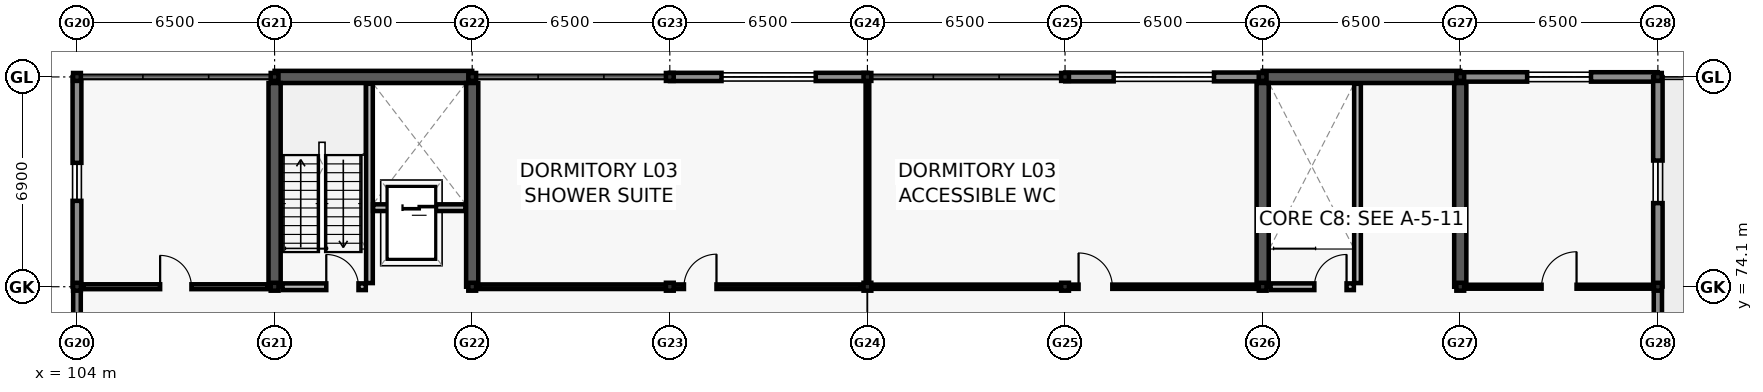
"""IFC4 building model, lengths in metres.
Left out: names, types, materials, properties, quantities, classifications, styles, units other than length and angle.
Written with IfcOpenShell. Run it as: python <this file> out.ifc"""

import sys

from ifc_helpers import new_model, si_unit, direction, frame, frame_2d, origin, origin_2d, place, context, subcontext, project, spatial, rectangle, i_section, extrude, element, fill, save


model = new_model("IFC4")
c1 = context("Model", 3, precision=1e-05, world=origin(), true_north=direction((0.0, 1.0)))
c2 = subcontext(c1, "Body", "Model", "MODEL_VIEW")
j1 = project(units=[si_unit("LENGTHUNIT", "METRE"), si_unit("PLANEANGLEUNIT", "RADIAN")], contexts=[c1])
p1 = place(None, origin())
s1 = spatial("IfcSite", under=j1, at=p1, CompositionType="ELEMENT")
p2 = place(p1, origin())
s2 = spatial("IfcBuilding", under=s1, at=p2, CompositionType="ELEMENT")
p3 = place(p2, frame((0.0, 0.0, 13.5)))
s3 = spatial("IfcBuildingStorey", under=s2, at=p3, CompositionType="ELEMENT", Elevation=13.5)
for number, where, z_axis, x_axis in (
    (1, (104.0, 74.1, 0.0), (0.0, 0.0, 1.0), (1.0, 0.0, 0.0)),
    (2, (104.0, 81.0, 0.0), (0.0, 0.0, 1.0), (1.0, 0.0, 0.0)),
    (3, (110.5, 74.1, 0.0), (0.0, 0.0, 1.0), (1.0, 0.0, 0.0)),
    (4, (110.5, 81.0, 0.0), (0.0, 0.0, 1.0), (1.0, 0.0, 0.0)),
    (5, (117.0, 74.1, 0.0), (0.0, 0.0, 1.0), (1.0, 0.0, 0.0)),
    (6, (117.0, 81.0, 0.0), (0.0, 0.0, 1.0), (1.0, 0.0, 0.0)),
    (7, (123.5, 74.1, 0.0), (0.0, 0.0, 1.0), (1.0, 0.0, 0.0)),
    (8, (123.5, 81.0, 0.0), (0.0, 0.0, 1.0), (1.0, 0.0, 0.0)),
    (9, (130.0, 74.1, 0.0), (0.0, 0.0, 1.0), (1.0, 0.0, 0.0)),
    (10, (130.0, 81.0, 0.0), (0.0, 0.0, 1.0), (1.0, 0.0, 0.0)),
    (11, (136.5, 74.1, 0.0), (0.0, 0.0, 1.0), (1.0, 0.0, 0.0)),
    (12, (136.5, 81.0, 0.0), (0.0, 0.0, 1.0), (1.0, 0.0, 0.0)),
    (13, (143.0, 74.1, 0.0), (0.0, 0.0, 1.0), (1.0, 0.0, 0.0)),
    (14, (143.0, 81.0, 0.0), (0.0, 0.0, 1.0), (1.0, 0.0, 0.0)),
    (15, (149.5, 74.1, 0.0), (0.0, 0.0, 1.0), (1.0, 0.0, 0.0)),
    (16, (149.5, 81.0, 0.0), (0.0, 0.0, 1.0), (1.0, 0.0, 0.0)),
    (17, (156.0, 74.1, 0.0), (0.0, 0.0, 1.0), (1.0, 0.0, 0.0)),
    (18, (156.0, 81.0, 0.0), (0.0, 0.0, 1.0), (1.0, 0.0, 0.0)),
):
    element("IfcColumn", number, at=place(p3, frame(where, z_axis=z_axis, x_axis=x_axis)), inside=s3, PredefinedType="COLUMN", context=c2, shape_type="SweptSolid", body=[
        extrude(i_section(OverallWidth=0.256, OverallDepth=0.26, WebThickness=0.01, FlangeThickness=0.017, FilletRadius=0.013, at=origin_2d()), origin(), (0.0, 0.0, 1.0), 3.9),
    ])
p4 = place(p3, frame((110.5, 81.0, 0.0), z_axis=(0.0, 0.0, 1.0), x_axis=(1.0, 0.0, 0.0)))
e19 = element("IfcWall", 19, at=p4, inside=s3, PredefinedType="SHEAR", context=c2, shape_type="SweptSolid", body=[
    extrude(rectangle(XDim=6.5, YDim=0.4, at=frame_2d((3.25, 0.0))), origin(), (0.0, 0.0, 1.0), 3.66),
])
for number, where, z_axis, x_axis in (
    (20, (110.5, 74.1, 0.0), (0.0, 0.0, 1.0), (0.0, 1.0, 0.0)),
    (21, (117.0, 74.1, 0.0), (0.0, 0.0, 1.0), (0.0, 1.0, 0.0)),
):
    element("IfcWall", number, at=place(p3, frame(where, z_axis=z_axis, x_axis=x_axis)), inside=s3, PredefinedType="SHEAR", context=c2, shape_type="SweptSolid", body=[
        extrude(rectangle(XDim=6.7, YDim=0.4, at=frame_2d((3.35, 0.0))), origin(), (0.0, 0.0, 1.0), 3.66),
    ])
p5 = place(p3, frame((143.0, 81.0, 0.0), z_axis=(0.0, 0.0, 1.0), x_axis=(1.0, 0.0, 0.0)))
e22 = element("IfcWall", 22, at=p5, inside=s3, PredefinedType="SHEAR", context=c2, shape_type="SweptSolid", body=[
    extrude(rectangle(XDim=6.5, YDim=0.4, at=frame_2d((3.25, 0.0))), origin(), (0.0, 0.0, 1.0), 3.66),
])
for number, where, z_axis, x_axis in (
    (23, (143.0, 74.1, 0.0), (0.0, 0.0, 1.0), (0.0, 1.0, 0.0)),
    (24, (149.5, 74.1, 0.0), (0.0, 0.0, 1.0), (0.0, 1.0, 0.0)),
):
    element("IfcWall", number, at=place(p3, frame(where, z_axis=z_axis, x_axis=x_axis)), inside=s3, PredefinedType="SHEAR", context=c2, shape_type="SweptSolid", body=[
        extrude(rectangle(XDim=6.7, YDim=0.4, at=frame_2d((3.35, 0.0))), origin(), (0.0, 0.0, 1.0), 3.66),
    ])
p6 = place(p3, frame((123.505, 81.0, 0.0), z_axis=(0.0, 0.0, 1.0), x_axis=(1.0, 0.0, 0.0)))
e25 = element("IfcWall", 25, at=p6, inside=s3, PredefinedType="SOLIDWALL", context=c2, shape_type="SweptSolid", body=[
    extrude(rectangle(XDim=6.49, YDim=0.27, at=frame_2d((3.245, 0.0))), origin(), (0.0, 0.0, 1.0), 3.02),
])
p7 = place(p6, frame((1.695, 0.0, 0.8)))
e26 = element("IfcOpeningElement", 26, at=p7, cuts=e25, PredefinedType="OPENING", context=c2, shape_type="SweptSolid", body=[
    extrude(rectangle(XDim=3.1, YDim=1.15, at=frame_2d((1.55, 0.575))), frame((0.0, 0.145, 0.0), z_axis=(0.0, -1.0, 0.0), x_axis=(1.0, 0.0, 0.0)), (0.0, 0.0, 1.0), 0.29),
])
p8 = place(p3, frame((136.505, 81.0, 0.0), z_axis=(0.0, 0.0, 1.0), x_axis=(1.0, 0.0, 0.0)))
e27 = element("IfcWall", 27, at=p8, inside=s3, PredefinedType="SOLIDWALL", context=c2, shape_type="SweptSolid", body=[
    extrude(rectangle(XDim=6.49, YDim=0.29, at=frame_2d((3.245, 0.0))), origin(), (0.0, 0.0, 1.0), 3.02),
])
p9 = place(p8, frame((1.595, 0.0, 0.8)))
e28 = element("IfcOpeningElement", 28, at=p9, cuts=e27, PredefinedType="OPENING", context=c2, shape_type="SweptSolid", body=[
    extrude(rectangle(XDim=3.3, YDim=1.25, at=frame_2d((1.65, 0.625))), frame((0.0, 0.155, 0.0), z_axis=(0.0, -1.0, 0.0), x_axis=(1.0, 0.0, 0.0)), (0.0, 0.0, 1.0), 0.31),
])
p10 = place(p3, frame((149.505, 81.0, 0.0), z_axis=(0.0, 0.0, 1.0), x_axis=(1.0, 0.0, 0.0)))
e29 = element("IfcWall", 29, at=p10, inside=s3, PredefinedType="SOLIDWALL", context=c2, shape_type="SweptSolid", body=[
    extrude(rectangle(XDim=6.49, YDim=0.31, at=frame_2d((3.245, 0.0))), origin(), (0.0, 0.0, 1.0), 3.02),
])
p11 = place(p10, frame((2.195, 0.0, 0.8)))
e30 = element("IfcOpeningElement", 30, at=p11, cuts=e29, PredefinedType="OPENING", context=c2, shape_type="SweptSolid", body=[
    extrude(rectangle(XDim=2.1, YDim=1.25, at=frame_2d((1.05, 0.625))), frame((0.0, 0.165, 0.0), z_axis=(0.0, -1.0, 0.0), x_axis=(1.0, 0.0, 0.0)), (0.0, 0.0, 1.0), 0.33),
])
p12 = place(p3, frame((104.0, 67.205, 0.0), z_axis=(0.0, 0.0, 1.0), x_axis=(0.0, 1.0, 0.0)))
e31 = element("IfcWall", 31, at=p12, inside=s3, PredefinedType="SOLIDWALL", context=c2, shape_type="SweptSolid", body=[
    extrude(rectangle(XDim=6.89, YDim=0.25, at=frame_2d((3.445, 0.0))), origin(), (0.0, 0.0, 1.0), 3.02),
])
p13 = place(p12, frame((1.613, 0.0, 0.8)))
e32 = element("IfcOpeningElement", 32, at=p13, cuts=e31, PredefinedType="OPENING", context=c2, shape_type="SweptSolid", body=[
    extrude(rectangle(XDim=1.1, YDim=1.5, at=frame_2d((0.55, 0.75))), frame((0.0, 0.135, 0.0), z_axis=(0.0, -1.0, 0.0), x_axis=(1.0, 0.0, 0.0)), (0.0, 0.0, 1.0), 0.27),
])
p14 = place(p3, frame((156.0, 74.095, 0.0), z_axis=(0.0, 0.0, 1.0), x_axis=(0.0, -1.0, 0.0)))
e33 = element("IfcWall", 33, at=p14, inside=s3, PredefinedType="SOLIDWALL", context=c2, shape_type="SweptSolid", body=[
    extrude(rectangle(XDim=6.89, YDim=0.27, at=frame_2d((3.445, 0.0))), origin(), (0.0, 0.0, 1.0), 3.02),
])
p15 = place(p14, frame((2.935, 0.0, 0.0)))
e34 = element("IfcOpeningElement", 34, at=p15, cuts=e33, PredefinedType="OPENING", context=c2, shape_type="SweptSolid", body=[
    extrude(rectangle(XDim=1.02, YDim=2.14, at=frame_2d((0.51, 1.07))), frame((0.0, 0.145, 0.0), z_axis=(0.0, -1.0, 0.0), x_axis=(1.0, 0.0, 0.0)), (0.0, 0.0, 1.0), 0.29),
])
p16 = place(p3, frame((104.0, 74.105, 0.0), z_axis=(0.0, 0.0, 1.0), x_axis=(0.0, 1.0, 0.0)))
e35 = element("IfcWall", 35, at=p16, inside=s3, PredefinedType="SOLIDWALL", context=c2, shape_type="SweptSolid", body=[
    extrude(rectangle(XDim=6.89, YDim=0.29, at=frame_2d((3.445, 0.0))), origin(), (0.0, 0.0, 1.0), 3.02),
])
p17 = place(p16, frame((2.82, 0.0, 0.8)))
e36 = element("IfcOpeningElement", 36, at=p17, cuts=e35, PredefinedType="OPENING", context=c2, shape_type="SweptSolid", body=[
    extrude(rectangle(XDim=1.25, YDim=1.5, at=frame_2d((0.625, 0.75))), frame((0.0, 0.155, 0.0), z_axis=(0.0, -1.0, 0.0), x_axis=(1.0, 0.0, 0.0)), (0.0, 0.0, 1.0), 0.31),
])
p18 = place(p3, frame((156.0, 80.995, 0.0), z_axis=(0.0, 0.0, 1.0), x_axis=(0.0, -1.0, 0.0)))
e37 = element("IfcWall", 37, at=p18, inside=s3, PredefinedType="SOLIDWALL", context=c2, shape_type="SweptSolid", body=[
    extrude(rectangle(XDim=6.89, YDim=0.31, at=frame_2d((3.445, 0.0))), origin(), (0.0, 0.0, 1.0), 3.02),
])
p19 = place(p18, frame((2.745, 0.0, 0.8)))
e38 = element("IfcOpeningElement", 38, at=p19, cuts=e37, PredefinedType="OPENING", context=c2, shape_type="SweptSolid", body=[
    extrude(rectangle(XDim=1.4, YDim=1.5, at=frame_2d((0.7, 0.75))), frame((0.0, 0.165, 0.0), z_axis=(0.0, -1.0, 0.0), x_axis=(1.0, 0.0, 0.0)), (0.0, 0.0, 1.0), 0.33),
])
p20 = place(p3, frame((113.62, 74.22, 0.0), z_axis=(0.0, 0.0, 1.0), x_axis=(0.0, 1.0, 0.0)))
e39 = element("IfcWall", 39, at=p20, inside=s3, PredefinedType="SOLIDWALL", context=c2, shape_type="SweptSolid", body=[
    extrude(rectangle(XDim=6.555, YDim=0.22, at=frame_2d((3.277, 0.0))), origin(), (0.0, 0.0, 1.0), 3.66),
])
p21 = place(p3, frame((110.76, 74.1, 0.0), z_axis=(0.0, 0.0, 1.0), x_axis=(1.0, 0.0, 0.0)))
e40 = element("IfcWall", 40, at=p21, inside=s3, PredefinedType="SOLIDWALL", context=c2, shape_type="SweptSolid", body=[
    extrude(rectangle(XDim=2.74, YDim=0.22, at=frame_2d((1.37, 0.0))), origin(), (0.0, 0.0, 1.0), 3.02),
])
p22 = place(p21, frame((1.44, 0.0, 0.0)))
e41 = element("IfcOpeningElement", 41, at=p22, cuts=e40, PredefinedType="OPENING", context=c2, shape_type="SweptSolid", body=[
    extrude(rectangle(XDim=1.06, YDim=2.1, at=frame_2d((0.53, 1.05))), frame((0.0, 0.12, 0.0), z_axis=(0.0, -1.0, 0.0), x_axis=(1.0, 0.0, 0.0)), (0.0, 0.0, 1.0), 0.24),
])
p23 = place(p3, frame((113.74, 76.7, 0.0), z_axis=(0.0, 0.0, 1.0), x_axis=(1.0, 0.0, 0.0)))
e42 = element("IfcWall", 42, at=p23, inside=s3, PredefinedType="SOLIDWALL", context=c2, shape_type="SweptSolid", body=[
    extrude(rectangle(XDim=3.035, YDim=0.22, at=frame_2d((1.518, 0.0))), origin(), (0.0, 0.0, 1.0), 3.66),
])
p24 = place(p23, frame((0.968, 0.0, 0.0)))
e43 = element("IfcOpeningElement", 43, at=p24, cuts=e42, PredefinedType="OPENING", context=c2, shape_type="SweptSolid", body=[
    extrude(rectangle(XDim=1.1, YDim=2.1, at=frame_2d((0.55, 1.05))), frame((0.0, 0.12, 0.0), z_axis=(0.0, -1.0, 0.0), x_axis=(1.0, 0.0, 0.0)), (0.0, 0.0, 1.0), 0.24),
])
p25 = place(p3, frame((146.12, 74.22, 0.0), z_axis=(0.0, 0.0, 1.0), x_axis=(0.0, 1.0, 0.0)))
e44 = element("IfcWall", 44, at=p25, inside=s3, PredefinedType="SOLIDWALL", context=c2, shape_type="SweptSolid", body=[
    extrude(rectangle(XDim=6.555, YDim=0.22, at=frame_2d((3.277, 0.0))), origin(), (0.0, 0.0, 1.0), 3.66),
])
p26 = place(p3, frame((143.26, 74.1, 0.0), z_axis=(0.0, 0.0, 1.0), x_axis=(1.0, 0.0, 0.0)))
e45 = element("IfcWall", 45, at=p26, inside=s3, PredefinedType="SOLIDWALL", context=c2, shape_type="SweptSolid", body=[
    extrude(rectangle(XDim=2.74, YDim=0.22, at=frame_2d((1.37, 0.0))), origin(), (0.0, 0.0, 1.0), 3.02),
])
p27 = place(p26, frame((1.44, 0.0, 0.0)))
e46 = element("IfcOpeningElement", 46, at=p27, cuts=e45, PredefinedType="OPENING", context=c2, shape_type="SweptSolid", body=[
    extrude(rectangle(XDim=1.06, YDim=2.1, at=frame_2d((0.53, 1.05))), frame((0.0, 0.12, 0.0), z_axis=(0.0, -1.0, 0.0), x_axis=(1.0, 0.0, 0.0)), (0.0, 0.0, 1.0), 0.24),
])
p28 = place(p3, frame((104.22, 74.1, 0.0), z_axis=(0.0, 0.0, 1.0), x_axis=(1.0, 0.0, 0.0)))
e47 = element("IfcWall", 47, at=p28, inside=s3, PredefinedType="PARTITIONING", context=c2, shape_type="SweptSolid", body=[
    extrude(rectangle(XDim=6.06, YDim=0.16, at=frame_2d((3.03, 0.0))), origin(), (0.0, 0.0, 1.0), 3.0),
])
p29 = place(p28, frame((2.515, 0.0, 0.0)))
e48 = element("IfcOpeningElement", 48, at=p29, cuts=e47, PredefinedType="OPENING", context=c2, shape_type="SweptSolid", body=[
    extrude(rectangle(XDim=1.03, YDim=2.06, at=frame_2d((0.515, 1.03))), frame((0.0, 0.09, 0.0), z_axis=(0.0, -1.0, 0.0), x_axis=(1.0, 0.0, 0.0)), (0.0, 0.0, 1.0), 0.18),
])
p30 = place(p3, frame((117.22, 74.1, 0.0), z_axis=(0.0, 0.0, 1.0), x_axis=(1.0, 0.0, 0.0)))
e49 = element("IfcWall", 49, at=p30, inside=s3, PredefinedType="PARTITIONING", context=c2, shape_type="SweptSolid", body=[
    extrude(rectangle(XDim=12.56, YDim=0.15, at=frame_2d((6.28, 0.0))), origin(), (0.0, 0.0, 1.0), 3.0),
])
p31 = place(p30, frame((6.745, 0.0, 0.0)))
e50 = element("IfcOpeningElement", 50, at=p31, cuts=e49, PredefinedType="OPENING", context=c2, shape_type="SweptSolid", body=[
    extrude(rectangle(XDim=1.07, YDim=2.08, at=frame_2d((0.535, 1.04))), frame((0.0, 0.085, 0.0), z_axis=(0.0, -1.0, 0.0), x_axis=(1.0, 0.0, 0.0)), (0.0, 0.0, 1.0), 0.17),
])
p32 = place(p3, frame((130.22, 74.1, 0.0), z_axis=(0.0, 0.0, 1.0), x_axis=(1.0, 0.0, 0.0)))
e51 = element("IfcWall", 51, at=p32, inside=s3, PredefinedType="PARTITIONING", context=c2, shape_type="SweptSolid", body=[
    extrude(rectangle(XDim=12.56, YDim=0.14, at=frame_2d((6.28, 0.0))), origin(), (0.0, 0.0, 1.0), 3.0),
])
p33 = place(p32, frame((6.725, 0.0, 0.0)))
e52 = element("IfcOpeningElement", 52, at=p33, cuts=e51, PredefinedType="OPENING", context=c2, shape_type="SweptSolid", body=[
    extrude(rectangle(XDim=1.11, YDim=2.1, at=frame_2d((0.555, 1.05))), frame((0.0, 0.08, 0.0), z_axis=(0.0, -1.0, 0.0), x_axis=(1.0, 0.0, 0.0)), (0.0, 0.0, 1.0), 0.16),
])
p34 = place(p3, frame((149.72, 74.1, 0.0), z_axis=(0.0, 0.0, 1.0), x_axis=(1.0, 0.0, 0.0)))
e53 = element("IfcWall", 53, at=p34, inside=s3, PredefinedType="PARTITIONING", context=c2, shape_type="SweptSolid", body=[
    extrude(rectangle(XDim=6.06, YDim=0.13, at=frame_2d((3.03, 0.0))), origin(), (0.0, 0.0, 1.0), 3.0),
])
p35 = place(p34, frame((2.455, 0.0, 0.0)))
e54 = element("IfcOpeningElement", 54, at=p35, cuts=e53, PredefinedType="OPENING", context=c2, shape_type="SweptSolid", body=[
    extrude(rectangle(XDim=1.15, YDim=2.12, at=frame_2d((0.575, 1.06))), frame((0.0, 0.075, 0.0), z_axis=(0.0, -1.0, 0.0), x_axis=(1.0, 0.0, 0.0)), (0.0, 0.0, 1.0), 0.15),
])
p36 = place(p3, frame((130.0, 74.32, 0.0), z_axis=(0.0, 0.0, 1.0), x_axis=(0.0, 1.0, 0.0)))
e55 = element("IfcWall", 55, at=p36, inside=s3, PredefinedType="PARTITIONING", context=c2, shape_type="SweptSolid", body=[
    extrude(rectangle(XDim=6.46, YDim=0.12, at=frame_2d((3.23, 0.0))), origin(), (0.0, 0.0, 1.0), 3.0),
])
p37 = place(p7, origin())
e56 = element("IfcWindow", 56, at=p37, inside=s3, PartitioningType="TRIPLE_PANEL_VERTICAL", PredefinedType="WINDOW", context=c2, shape_type="SweptSolid", body=[
    extrude(rectangle(XDim=3.1, YDim=1.15, at=frame_2d((1.55, 0.575))), frame((0.0, 0.03, 0.0), z_axis=(0.0, -1.0, 0.0), x_axis=(1.0, 0.0, 0.0)), (0.0, 0.0, 1.0), 0.06),
])
fill(e26, e56)
p38 = place(p9, origin())
e57 = element("IfcWindow", 57, at=p38, inside=s3, PartitioningType="TRIPLE_PANEL_VERTICAL", PredefinedType="WINDOW", context=c2, shape_type="SweptSolid", body=[
    extrude(rectangle(XDim=3.3, YDim=1.25, at=frame_2d((1.65, 0.625))), frame((0.0, 0.03, 0.0), z_axis=(0.0, -1.0, 0.0), x_axis=(1.0, 0.0, 0.0)), (0.0, 0.0, 1.0), 0.06),
])
fill(e28, e57)
p39 = place(p11, origin())
e58 = element("IfcWindow", 58, at=p39, inside=s3, PartitioningType="DOUBLE_PANEL_VERTICAL", PredefinedType="WINDOW", context=c2, shape_type="SweptSolid", body=[
    extrude(rectangle(XDim=2.1, YDim=1.25, at=frame_2d((1.05, 0.625))), frame((0.0, 0.03, 0.0), z_axis=(0.0, -1.0, 0.0), x_axis=(1.0, 0.0, 0.0)), (0.0, 0.0, 1.0), 0.06),
])
fill(e30, e58)
p40 = place(p17, origin())
e59 = element("IfcWindow", 59, at=p40, inside=s3, PartitioningType="SINGLE_PANEL", PredefinedType="WINDOW", context=c2, shape_type="SweptSolid", body=[
    extrude(rectangle(XDim=1.25, YDim=1.5, at=frame_2d((0.625, 0.75))), frame((0.0, 0.03, 0.0), z_axis=(0.0, -1.0, 0.0), x_axis=(1.0, 0.0, 0.0)), (0.0, 0.0, 1.0), 0.06),
])
fill(e36, e59)
p41 = place(p19, origin())
e60 = element("IfcWindow", 60, at=p41, inside=s3, PartitioningType="SINGLE_PANEL", PredefinedType="WINDOW", context=c2, shape_type="SweptSolid", body=[
    extrude(rectangle(XDim=1.4, YDim=1.5, at=frame_2d((0.7, 0.75))), frame((0.0, 0.03, 0.0), z_axis=(0.0, -1.0, 0.0), x_axis=(1.0, 0.0, 0.0)), (0.0, 0.0, 1.0), 0.06),
])
fill(e38, e60)
p42 = place(p22, origin())
e61 = element("IfcDoor", 61, at=p42, inside=s3, OperationType="SINGLE_SWING_LEFT", PredefinedType="DOOR", context=c2, shape_type="SweptSolid", body=[
    extrude(rectangle(XDim=1.06, YDim=2.1, at=frame_2d((0.53, 1.05))), frame((0.0, 0.025, 0.0), z_axis=(0.0, -1.0, 0.0), x_axis=(1.0, 0.0, 0.0)), (0.0, 0.0, 1.0), 0.05),
])
fill(e41, e61)
p43 = place(p24, origin())
e62 = element("IfcDoor", 62, at=p43, inside=s3, OperationType="DOUBLE_DOOR_SLIDING", PredefinedType="DOOR", context=c2, shape_type="SweptSolid", body=[
    extrude(rectangle(XDim=1.1, YDim=2.1, at=frame_2d((0.55, 1.05))), frame((0.0, 0.025, 0.0), z_axis=(0.0, -1.0, 0.0), x_axis=(1.0, 0.0, 0.0)), (0.0, 0.0, 1.0), 0.05),
])
fill(e43, e62)
p44 = place(p27, origin())
e63 = element("IfcDoor", 63, at=p44, inside=s3, OperationType="SINGLE_SWING_RIGHT", PredefinedType="DOOR", context=c2, shape_type="SweptSolid", body=[
    extrude(rectangle(XDim=1.06, YDim=2.1, at=frame_2d((0.53, 1.05))), frame((0.0, 0.025, 0.0), z_axis=(0.0, -1.0, 0.0), x_axis=(1.0, 0.0, 0.0)), (0.0, 0.0, 1.0), 0.05),
])
fill(e46, e63)
p45 = place(p29, origin())
e64 = element("IfcDoor", 64, at=p45, inside=s3, OperationType="SINGLE_SWING_LEFT", PredefinedType="DOOR", context=c2, shape_type="SweptSolid", body=[
    extrude(rectangle(XDim=1.03, YDim=2.06, at=frame_2d((0.515, 1.03))), frame((0.0, 0.025, 0.0), z_axis=(0.0, -1.0, 0.0), x_axis=(1.0, 0.0, 0.0)), (0.0, 0.0, 1.0), 0.05),
])
fill(e48, e64)
p46 = place(p31, origin())
e65 = element("IfcDoor", 65, at=p46, inside=s3, OperationType="SINGLE_SWING_RIGHT", PredefinedType="DOOR", context=c2, shape_type="SweptSolid", body=[
    extrude(rectangle(XDim=1.07, YDim=2.08, at=frame_2d((0.535, 1.04))), frame((0.0, 0.025, 0.0), z_axis=(0.0, -1.0, 0.0), x_axis=(1.0, 0.0, 0.0)), (0.0, 0.0, 1.0), 0.05),
])
fill(e50, e65)
p47 = place(p33, origin())
e66 = element("IfcDoor", 66, at=p47, inside=s3, OperationType="SINGLE_SWING_LEFT", PredefinedType="DOOR", context=c2, shape_type="SweptSolid", body=[
    extrude(rectangle(XDim=1.11, YDim=2.1, at=frame_2d((0.555, 1.05))), frame((0.0, 0.025, 0.0), z_axis=(0.0, -1.0, 0.0), x_axis=(1.0, 0.0, 0.0)), (0.0, 0.0, 1.0), 0.05),
])
fill(e52, e66)
p48 = place(p35, origin())
e67 = element("IfcDoor", 67, at=p48, inside=s3, OperationType="SINGLE_SWING_RIGHT", PredefinedType="DOOR", context=c2, shape_type="SweptSolid", body=[
    extrude(rectangle(XDim=1.15, YDim=2.12, at=frame_2d((0.575, 1.06))), frame((0.0, 0.025, 0.0), z_axis=(0.0, -1.0, 0.0), x_axis=(1.0, 0.0, 0.0)), (0.0, 0.0, 1.0), 0.05),
])
fill(e54, e67)
save(model, sys.argv[1])
